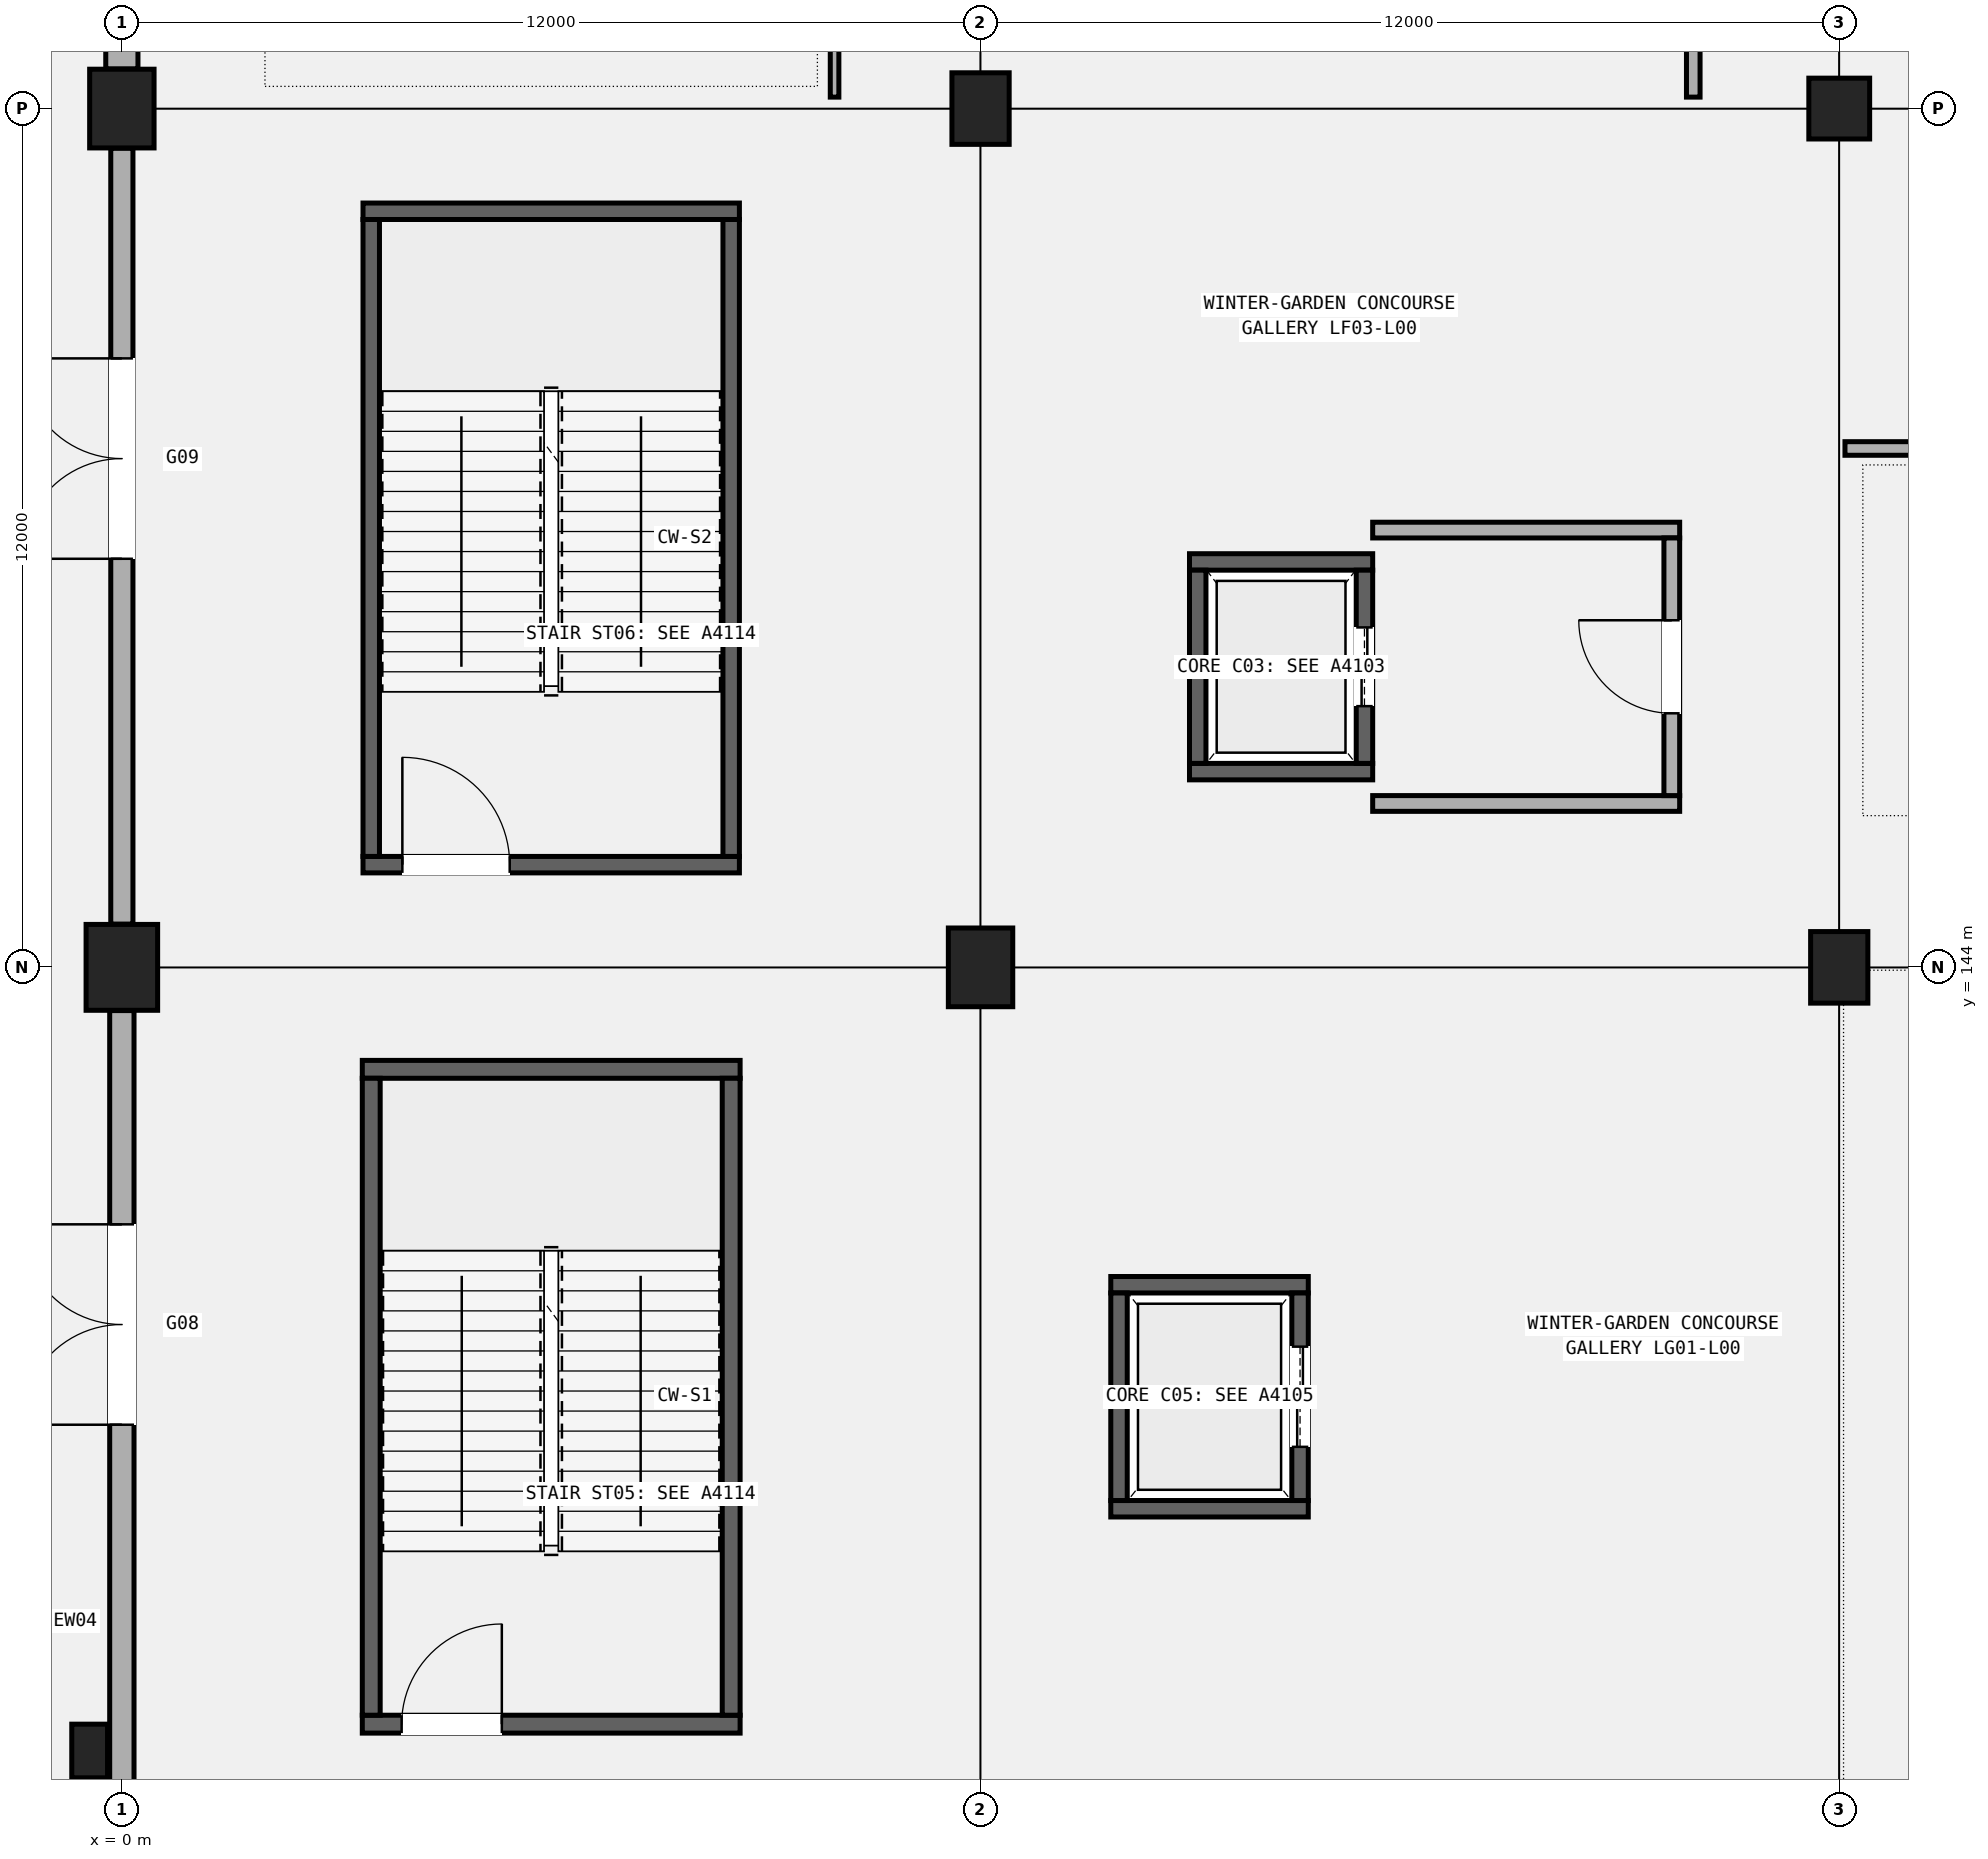
"""IFC4 building model, lengths in metres.
Left out: names, types, materials, properties, quantities, classifications, styles, units other than length and angle.
Written with IfcOpenShell. Run it as: python <this file> out.ifc"""

import sys

from ifc_helpers import new_model, si_unit, direction, frame, frame_2d, origin, origin_2d, place, context, subcontext, project, spatial, rectangle, circle, extrude, element, fill, save


model = new_model("IFC4")
c1 = context("Model", 3, precision=1e-05, world=origin(), true_north=direction((0.0, 1.0)))
c2 = subcontext(c1, "Body", "Model", "MODEL_VIEW")
j1 = project(units=[si_unit("LENGTHUNIT", "METRE"), si_unit("PLANEANGLEUNIT", "RADIAN")], contexts=[c1])
p1 = place(None, origin())
s1 = spatial("IfcSite", under=j1, at=p1, CompositionType="ELEMENT")
p2 = place(p1, origin())
s2 = spatial("IfcBuilding", under=s1, at=p2, CompositionType="ELEMENT")
p3 = place(p2, origin())
s3 = spatial("IfcBuildingStorey", under=s2, at=p3, CompositionType="ELEMENT", Elevation=0.0)
p4 = place(p3, frame((0.0, 144.0, 0.0), z_axis=(0.0, 0.0, 1.0), x_axis=(1.0, 0.0, 0.0)))
e1 = element("IfcColumn", 1, at=p4, inside=s3, PredefinedType="COLUMN", context=c2, shape_type="SweptSolid", body=[
    extrude(rectangle(XDim=1.0, YDim=1.2, at=origin_2d()), origin(), (0.0, 0.0, 1.0), 5.4),
])
for number, where, z_axis, x_axis in (
    (2, (0.0, 156.0, 0.0), (0.0, 0.0, 1.0), (1.0, 0.0, 0.0)),
    (3, (12.0, 144.0, 0.0), (0.0, 0.0, 1.0), (1.0, 0.0, 0.0)),
):
    element("IfcColumn", number, at=place(p3, frame(where, z_axis=z_axis, x_axis=x_axis)), inside=s3, PredefinedType="COLUMN", context=c2, shape_type="SweptSolid", body=[
        extrude(rectangle(XDim=0.9, YDim=1.1, at=origin_2d()), origin(), (0.0, 0.0, 1.0), 5.4),
    ])
for number, where, z_axis, x_axis in (
    (4, (12.0, 156.0, 0.0), (0.0, 0.0, 1.0), (1.0, 0.0, 0.0)),
    (5, (24.0, 144.0, 0.0), (0.0, 0.0, 1.0), (1.0, 0.0, 0.0)),
):
    element("IfcColumn", number, at=place(p3, frame(where, z_axis=z_axis, x_axis=x_axis)), inside=s3, PredefinedType="COLUMN", context=c2, shape_type="SweptSolid", body=[
        extrude(rectangle(XDim=0.8, YDim=1.0, at=origin_2d()), origin(), (0.0, 0.0, 1.0), 5.4),
    ])
p5 = place(p3, frame((24.0, 156.0, 0.0), z_axis=(0.0, 0.0, 1.0), x_axis=(1.0, 0.0, 0.0)))
e6 = element("IfcColumn", 6, at=p5, inside=s3, PredefinedType="COLUMN", context=c2, shape_type="SweptSolid", body=[
    extrude(circle(Radius=0.425, at=origin_2d()), origin(), (0.0, 0.0, 1.0), 5.4),
])
p6 = place(p3, frame((-0.45, 133.05, 0.0), z_axis=(0.0, 0.0, 1.0), x_axis=(1.0, 0.0, 0.0)))
e7 = element("IfcColumn", 7, at=p6, inside=s3, PredefinedType="PILASTER", context=c2, shape_type="SweptSolid", body=[
    extrude(rectangle(XDim=0.5, YDim=0.75, at=origin_2d()), origin(), (0.0, 0.0, 1.0), 5.4),
])
p7 = place(p3, frame((0.0, 132.429, 0.0), z_axis=(0.0, 0.0, 1.0), x_axis=(0.0, 1.0, 0.0)))
e8 = element("IfcWall", 8, at=p7, inside=s3, PredefinedType="SOLIDWALL", context=c2, shape_type="SweptSolid", body=[
    extrude(rectangle(XDim=10.967, YDim=0.34, at=frame_2d((5.483, 0.0))), origin(), (0.0, 0.0, 1.0), 4.44),
])
p8 = place(p7, frame((5.18, 0.0, 0.0)))
e9 = element("IfcOpeningElement", 9, at=p8, cuts=e8, PredefinedType="OPENING", context=c2, shape_type="SweptSolid", body=[
    extrude(rectangle(XDim=2.8, YDim=2.4, at=frame_2d((1.4, 1.2))), frame((0.0, 0.18, 0.0), z_axis=(0.0, -1.0, 0.0), x_axis=(1.0, 0.0, 0.0)), (0.0, 0.0, 1.0), 0.36),
])
p9 = place(p3, frame((0.0, 144.604, 0.0), z_axis=(0.0, 0.0, 1.0), x_axis=(0.0, 1.0, 0.0)))
e10 = element("IfcWall", 10, at=p9, inside=s3, PredefinedType="SOLIDWALL", context=c2, shape_type="SweptSolid", body=[
    extrude(rectangle(XDim=10.842, YDim=0.31, at=frame_2d((5.421, 0.0))), origin(), (0.0, 0.0, 1.0), 4.24),
])
p10 = place(p9, frame((5.105, 0.0, 0.0)))
e11 = element("IfcOpeningElement", 11, at=p10, cuts=e10, PredefinedType="OPENING", context=c2, shape_type="SweptSolid", body=[
    extrude(rectangle(XDim=2.8, YDim=2.4, at=frame_2d((1.4, 1.2))), frame((0.0, 0.165, 0.0), z_axis=(0.0, -1.0, 0.0), x_axis=(1.0, 0.0, 0.0)), (0.0, 0.0, 1.0), 0.33),
])
p11 = place(p3, frame((0.0, 156.554, 0.0), z_axis=(0.0, 0.0, 1.0), x_axis=(0.0, 1.0, 0.0)))
e12 = element("IfcWall", 12, at=p11, inside=s3, PredefinedType="SOLIDWALL", context=c2, shape_type="SweptSolid", body=[
    extrude(rectangle(XDim=10.942, YDim=0.45, at=frame_2d((5.471, 0.0))), origin(), (0.0, 0.0, 1.0), 4.34),
])
p12 = place(p11, frame((4.528, 0.0, 0.0)))
e13 = element("IfcOpeningElement", 13, at=p12, cuts=e12, PredefinedType="OPENING", context=c2, shape_type="SweptSolid", body=[
    extrude(rectangle(XDim=3.2, YDim=2.6, at=frame_2d((1.6, 1.3))), frame((0.0, 0.235, 0.0), z_axis=(0.0, -1.0, 0.0), x_axis=(1.0, 0.0, 0.0)), (0.0, 0.0, 1.0), 0.47),
])
p13 = place(p3, frame((3.36, 133.425, 0.0), z_axis=(0.0, 0.0, 1.0), x_axis=(1.0, 0.0, 0.0)))
e14 = element("IfcWall", 14, at=p13, inside=s3, PredefinedType="SHEAR", context=c2, shape_type="SweptSolid", body=[
    extrude(rectangle(XDim=5.28, YDim=0.25, at=frame_2d((2.64, 0.0))), origin(), (0.0, 0.0, 1.0), 5.14),
])
p14 = place(p13, frame((0.55, 0.0, 0.0)))
e15 = element("IfcOpeningElement", 15, at=p14, cuts=e14, PredefinedType="OPENING", context=c2, shape_type="SweptSolid", body=[
    extrude(rectangle(XDim=1.4, YDim=2.15, at=frame_2d((0.7, 1.075))), frame((0.0, 0.135, 0.0), z_axis=(0.0, -1.0, 0.0), x_axis=(1.0, 0.0, 0.0)), (0.0, 0.0, 1.0), 0.27),
])
p15 = place(p3, frame((3.36, 142.575, 0.0), z_axis=(0.0, 0.0, 1.0), x_axis=(1.0, 0.0, 0.0)))
e16 = element("IfcWall", 16, at=p15, inside=s3, PredefinedType="SHEAR", context=c2, shape_type="SweptSolid", body=[
    extrude(rectangle(XDim=5.28, YDim=0.25, at=frame_2d((2.64, 0.0))), origin(), (0.0, 0.0, 1.0), 5.14),
])
for number, where, z_axis, x_axis in (
    (17, (3.485, 133.55, 0.0), (0.0, 0.0, 1.0), (0.0, 1.0, 0.0)),
    (18, (8.515, 133.55, 0.0), (0.0, 0.0, 1.0), (0.0, 1.0, 0.0)),
):
    element("IfcWall", number, at=place(p3, frame(where, z_axis=z_axis, x_axis=x_axis)), inside=s3, PredefinedType="SHEAR", context=c2, shape_type="SweptSolid", body=[
        extrude(rectangle(XDim=8.9, YDim=0.25, at=frame_2d((4.45, 0.0))), origin(), (0.0, 0.0, 1.0), 5.14),
    ])
p16 = place(p3, frame((3.37, 145.435, 0.0), z_axis=(0.0, 0.0, 1.0), x_axis=(1.0, 0.0, 0.0)))
e19 = element("IfcWall", 19, at=p16, inside=s3, PredefinedType="SHEAR", context=c2, shape_type="SweptSolid", body=[
    extrude(rectangle(XDim=5.26, YDim=0.23, at=frame_2d((2.63, 0.0))), origin(), (0.0, 0.0, 1.0), 5.14),
])
p17 = place(p16, frame((0.55, 0.0, 0.0)))
e20 = element("IfcOpeningElement", 20, at=p17, cuts=e19, PredefinedType="OPENING", context=c2, shape_type="SweptSolid", body=[
    extrude(rectangle(XDim=1.5, YDim=2.2, at=frame_2d((0.75, 1.1))), frame((0.0, 0.125, 0.0), z_axis=(0.0, -1.0, 0.0), x_axis=(1.0, 0.0, 0.0)), (0.0, 0.0, 1.0), 0.25),
])
p18 = place(p3, frame((3.37, 154.565, 0.0), z_axis=(0.0, 0.0, 1.0), x_axis=(1.0, 0.0, 0.0)))
e21 = element("IfcWall", 21, at=p18, inside=s3, PredefinedType="SHEAR", context=c2, shape_type="SweptSolid", body=[
    extrude(rectangle(XDim=5.26, YDim=0.23, at=frame_2d((2.63, 0.0))), origin(), (0.0, 0.0, 1.0), 5.14),
])
for number, where, z_axis, x_axis in (
    (22, (3.485, 145.55, 0.0), (0.0, 0.0, 1.0), (0.0, 1.0, 0.0)),
    (23, (8.515, 145.55, 0.0), (0.0, 0.0, 1.0), (0.0, 1.0, 0.0)),
):
    element("IfcWall", number, at=place(p3, frame(where, z_axis=z_axis, x_axis=x_axis)), inside=s3, PredefinedType="SHEAR", context=c2, shape_type="SweptSolid", body=[
        extrude(rectangle(XDim=8.9, YDim=0.23, at=frame_2d((4.45, 0.0))), origin(), (0.0, 0.0, 1.0), 5.14),
    ])
for number, where, z_axis, x_axis in (
    (24, (14.92, 146.735, 0.0), (0.0, 0.0, 1.0), (1.0, 0.0, 0.0)),
    (25, (14.92, 149.665, 0.0), (0.0, 0.0, 1.0), (1.0, 0.0, 0.0)),
):
    element("IfcWall", number, at=place(p3, frame(where, z_axis=z_axis, x_axis=x_axis)), inside=s3, PredefinedType="SHEAR", context=c2, shape_type="SweptSolid", body=[
        extrude(rectangle(XDim=2.56, YDim=0.23, at=frame_2d((1.28, 0.0))), origin(), (0.0, 0.0, 1.0), 5.14),
    ])
p19 = place(p3, frame((15.035, 146.85, 0.0), z_axis=(0.0, 0.0, 1.0), x_axis=(0.0, 1.0, 0.0)))
e26 = element("IfcWall", 26, at=p19, inside=s3, PredefinedType="SHEAR", context=c2, shape_type="SweptSolid", body=[
    extrude(rectangle(XDim=2.7, YDim=0.23, at=frame_2d((1.35, 0.0))), origin(), (0.0, 0.0, 1.0), 5.14),
])
p20 = place(p3, frame((17.365, 146.85, 0.0), z_axis=(0.0, 0.0, 1.0), x_axis=(0.0, 1.0, 0.0)))
e27 = element("IfcWall", 27, at=p20, inside=s3, PredefinedType="SHEAR", context=c2, shape_type="SweptSolid", body=[
    extrude(rectangle(XDim=2.7, YDim=0.23, at=frame_2d((1.35, 0.0))), origin(), (0.0, 0.0, 1.0), 5.14),
])
p21 = place(p20, frame((0.8, 0.0, 0.0)))
e28 = element("IfcOpeningElement", 28, at=p21, cuts=e27, PredefinedType="OPENING", context=c2, shape_type="SweptSolid", body=[
    extrude(rectangle(XDim=1.1, YDim=2.15, at=frame_2d((0.55, 1.075))), frame((0.0, 0.125, 0.0), z_axis=(0.0, -1.0, 0.0), x_axis=(1.0, 0.0, 0.0)), (0.0, 0.0, 1.0), 0.25),
])
for number, where, z_axis, x_axis in (
    (29, (17.48, 146.29, 0.0), (0.0, 0.0, 1.0), (1.0, 0.0, 0.0)),
    (30, (17.48, 150.11, 0.0), (0.0, 0.0, 1.0), (1.0, 0.0, 0.0)),
):
    element("IfcWall", number, at=place(p3, frame(where, z_axis=z_axis, x_axis=x_axis)), inside=s3, PredefinedType="SOLIDWALL", context=c2, shape_type="SweptSolid", body=[
        extrude(rectangle(XDim=4.29, YDim=0.22, at=frame_2d((2.145, 0.0))), origin(), (0.0, 0.0, 1.0), 4.52),
    ])
p22 = place(p3, frame((21.66, 146.4, 0.0), z_axis=(0.0, 0.0, 1.0), x_axis=(0.0, 1.0, 0.0)))
e31 = element("IfcWall", 31, at=p22, inside=s3, PredefinedType="SOLIDWALL", context=c2, shape_type="SweptSolid", body=[
    extrude(rectangle(XDim=3.6, YDim=0.22, at=frame_2d((1.8, 0.0))), origin(), (0.0, 0.0, 1.0), 4.52),
])
p23 = place(p22, frame((1.15, 0.0, 0.0)))
e32 = element("IfcOpeningElement", 32, at=p23, cuts=e31, PredefinedType="OPENING", context=c2, shape_type="SweptSolid", body=[
    extrude(rectangle(XDim=1.3, YDim=2.15, at=frame_2d((0.65, 1.075))), frame((0.0, 0.12, 0.0), z_axis=(0.0, -1.0, 0.0), x_axis=(1.0, 0.0, 0.0)), (0.0, 0.0, 1.0), 0.24),
])
for number, where, z_axis, x_axis in (
    (33, (13.82, 136.435, 0.0), (0.0, 0.0, 1.0), (1.0, 0.0, 0.0)),
    (34, (13.82, 139.565, 0.0), (0.0, 0.0, 1.0), (1.0, 0.0, 0.0)),
):
    element("IfcWall", number, at=place(p3, frame(where, z_axis=z_axis, x_axis=x_axis)), inside=s3, PredefinedType="SHEAR", context=c2, shape_type="SweptSolid", body=[
        extrude(rectangle(XDim=2.76, YDim=0.23, at=frame_2d((1.38, 0.0))), origin(), (0.0, 0.0, 1.0), 5.14),
    ])
p24 = place(p3, frame((13.935, 136.55, 0.0), z_axis=(0.0, 0.0, 1.0), x_axis=(0.0, 1.0, 0.0)))
e35 = element("IfcWall", 35, at=p24, inside=s3, PredefinedType="SHEAR", context=c2, shape_type="SweptSolid", body=[
    extrude(rectangle(XDim=2.9, YDim=0.23, at=frame_2d((1.45, 0.0))), origin(), (0.0, 0.0, 1.0), 5.14),
])
p25 = place(p3, frame((16.465, 136.55, 0.0), z_axis=(0.0, 0.0, 1.0), x_axis=(0.0, 1.0, 0.0)))
e36 = element("IfcWall", 36, at=p25, inside=s3, PredefinedType="SHEAR", context=c2, shape_type="SweptSolid", body=[
    extrude(rectangle(XDim=2.9, YDim=0.23, at=frame_2d((1.45, 0.0))), origin(), (0.0, 0.0, 1.0), 5.14),
])
p26 = place(p25, frame((0.75, 0.0, 0.0)))
e37 = element("IfcOpeningElement", 37, at=p26, cuts=e36, PredefinedType="OPENING", context=c2, shape_type="SweptSolid", body=[
    extrude(rectangle(XDim=1.4, YDim=2.25, at=frame_2d((0.7, 1.125))), frame((0.0, 0.125, 0.0), z_axis=(0.0, -1.0, 0.0), x_axis=(1.0, 0.0, 0.0)), (0.0, 0.0, 1.0), 0.25),
])
p27 = place(p3, frame((9.96, 156.16, 0.0), z_axis=(0.0, 0.0, 1.0), x_axis=(0.0, 1.0, 0.0)))
e38 = element("IfcWall", 38, at=p27, inside=s3, PredefinedType="PARTITIONING", context=c2, shape_type="SweptSolid", body=[
    extrude(rectangle(XDim=9.99, YDim=0.12, at=frame_2d((4.995, 0.0))), origin(), (0.0, 0.0, 1.0), 4.52),
])
p28 = place(p27, frame((4.295, 0.0, 0.0)))
e39 = element("IfcOpeningElement", 39, at=p28, cuts=e38, PredefinedType="OPENING", context=c2, shape_type="SweptSolid", body=[
    extrude(rectangle(XDim=1.4, YDim=2.24, at=frame_2d((0.7, 1.12))), frame((0.0, 0.07, 0.0), z_axis=(0.0, -1.0, 0.0), x_axis=(1.0, 0.0, 0.0)), (0.0, 0.0, 1.0), 0.14),
])
p29 = place(p3, frame((21.96, 156.16, 0.0), z_axis=(0.0, 0.0, 1.0), x_axis=(0.0, 1.0, 0.0)))
e40 = element("IfcWall", 40, at=p29, inside=s3, PredefinedType="PARTITIONING", context=c2, shape_type="SweptSolid", body=[
    extrude(rectangle(XDim=11.698, YDim=0.19, at=frame_2d((5.849, 0.0))), origin(), (0.0, 0.0, 1.0), 4.52),
])
p30 = place(p29, frame((5.06, 0.0, 0.0)))
e41 = element("IfcOpeningElement", 41, at=p30, cuts=e40, PredefinedType="OPENING", context=c2, shape_type="SweptSolid", body=[
    extrude(rectangle(XDim=1.56, YDim=2.26, at=frame_2d((0.78, 1.13))), frame((0.0, 0.105, 0.0), z_axis=(0.0, -1.0, 0.0), x_axis=(1.0, 0.0, 0.0)), (0.0, 0.0, 1.0), 0.21),
])
p31 = place(p3, frame((24.08, 151.25, 0.0), z_axis=(0.0, 0.0, 1.0), x_axis=(1.0, 0.0, 0.0)))
e42 = element("IfcWall", 42, at=p31, inside=s3, PredefinedType="PARTITIONING", context=c2, shape_type="SweptSolid", body=[
    extrude(rectangle(XDim=10.29, YDim=0.19, at=frame_2d((5.145, 0.0))), origin(), (0.0, 0.0, 1.0), 4.52),
])
p32 = place(p8, origin())
e43 = element("IfcDoor", 43, at=p32, inside=s3, OperationType="DOUBLE_DOOR_SINGLE_SWING", PredefinedType="DOOR", context=c2, shape_type="SweptSolid", body=[
    extrude(rectangle(XDim=2.8, YDim=2.4, at=frame_2d((1.4, 1.2))), frame((0.0, 0.025, 0.0), z_axis=(0.0, -1.0, 0.0), x_axis=(1.0, 0.0, 0.0)), (0.0, 0.0, 1.0), 0.05),
])
fill(e9, e43)
p33 = place(p10, origin())
e44 = element("IfcDoor", 44, at=p33, inside=s3, OperationType="DOUBLE_DOOR_SINGLE_SWING", PredefinedType="DOOR", context=c2, shape_type="SweptSolid", body=[
    extrude(rectangle(XDim=2.8, YDim=2.4, at=frame_2d((1.4, 1.2))), frame((0.0, 0.025, 0.0), z_axis=(0.0, -1.0, 0.0), x_axis=(1.0, 0.0, 0.0)), (0.0, 0.0, 1.0), 0.05),
])
fill(e11, e44)
p34 = place(p14, origin())
e45 = element("IfcDoor", 45, at=p34, inside=s3, OperationType="SINGLE_SWING_RIGHT", PredefinedType="DOOR", context=c2, shape_type="SweptSolid", body=[
    extrude(rectangle(XDim=1.4, YDim=2.15, at=frame_2d((0.7, 1.075))), frame((0.0, 0.025, 0.0), z_axis=(0.0, -1.0, 0.0), x_axis=(1.0, 0.0, 0.0)), (0.0, 0.0, 1.0), 0.05),
])
fill(e15, e45)
p35 = place(p17, origin())
e46 = element("IfcDoor", 46, at=p35, inside=s3, OperationType="SINGLE_SWING_LEFT", PredefinedType="DOOR", context=c2, shape_type="SweptSolid", body=[
    extrude(rectangle(XDim=1.5, YDim=2.2, at=frame_2d((0.75, 1.1))), frame((0.0, 0.025, 0.0), z_axis=(0.0, -1.0, 0.0), x_axis=(1.0, 0.0, 0.0)), (0.0, 0.0, 1.0), 0.05),
])
fill(e20, e46)
p36 = place(p21, origin())
e47 = element("IfcDoor", 47, at=p36, inside=s3, OperationType="DOUBLE_DOOR_SLIDING", PredefinedType="DOOR", context=c2, shape_type="SweptSolid", body=[
    extrude(rectangle(XDim=1.1, YDim=2.15, at=frame_2d((0.55, 1.075))), frame((0.0, 0.025, 0.0), z_axis=(0.0, -1.0, 0.0), x_axis=(1.0, 0.0, 0.0)), (0.0, 0.0, 1.0), 0.05),
])
fill(e28, e47)
p37 = place(p23, origin())
e48 = element("IfcDoor", 48, at=p37, inside=s3, OperationType="SINGLE_SWING_RIGHT", PredefinedType="DOOR", context=c2, shape_type="SweptSolid", body=[
    extrude(rectangle(XDim=1.3, YDim=2.15, at=frame_2d((0.65, 1.075))), frame((0.0, 0.025, 0.0), z_axis=(0.0, -1.0, 0.0), x_axis=(1.0, 0.0, 0.0)), (0.0, 0.0, 1.0), 0.05),
])
fill(e32, e48)
p38 = place(p26, origin())
e49 = element("IfcDoor", 49, at=p38, inside=s3, OperationType="DOUBLE_DOOR_SLIDING", PredefinedType="DOOR", context=c2, shape_type="SweptSolid", body=[
    extrude(rectangle(XDim=1.4, YDim=2.25, at=frame_2d((0.7, 1.125))), frame((0.0, 0.025, 0.0), z_axis=(0.0, -1.0, 0.0), x_axis=(1.0, 0.0, 0.0)), (0.0, 0.0, 1.0), 0.05),
])
fill(e37, e49)
save(model, sys.argv[1])
